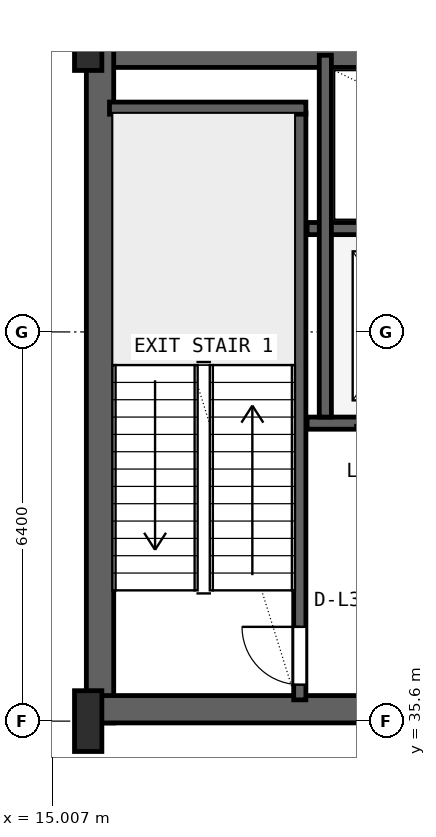
"""IFC4 building model, lengths in metres.
Left out: names, types, materials, properties, quantities, classifications, styles, units other than length and angle.
Written with IfcOpenShell. Run it as: python <this file> out.ifc"""

import sys

from ifc_helpers import new_model, si_unit, direction, frame, frame_2d, origin, origin_2d, place, context, subcontext, project, spatial, rectangle, i_section, extrude, source, transform, mapped, element, fill, save


model = new_model("IFC4")
c1 = context("Model", 3, precision=1e-05, world=origin(), true_north=direction((0.0, 1.0)))
c2 = subcontext(c1, "Body", "Model", "MODEL_VIEW")
j1 = project(units=[si_unit("LENGTHUNIT", "METRE"), si_unit("PLANEANGLEUNIT", "RADIAN")], contexts=[c1])
p1 = place(None, origin())
s1 = spatial("IfcSite", under=j1, at=p1, CompositionType="ELEMENT")
p2 = place(p1, origin())
s2 = spatial("IfcBuilding", under=s1, at=p2, CompositionType="ELEMENT")
p3 = place(p2, frame((0.0, 0.0, 141.0)))
s3 = spatial("IfcBuildingStorey", under=s2, at=p3, CompositionType="ELEMENT", Elevation=141.0)
p4 = place(p3, frame((15.6, 46.575, 0.0), z_axis=(0.0, 0.0, 1.0), x_axis=(1.0, 0.0, 0.0)))
e1 = element("IfcWall", 1, at=p4, inside=s3, PredefinedType="SHEAR", context=c2, shape_type="SweptSolid", body=[
    extrude(rectangle(XDim=36.8, YDim=0.45, at=frame_2d((18.4, 0.0))), origin(), (0.0, 0.0, 1.0), 4.55),
])
p5 = place(p3, frame((15.795, 35.57, 0.0), z_axis=(0.0, 0.0, 1.0), x_axis=(0.0, 1.0, 0.0)))
e2 = element("IfcWall", 2, at=p5, inside=s3, PredefinedType="SHEAR", context=c2, shape_type="SweptSolid", body=[
    extrude(rectangle(XDim=11.23, YDim=0.45, at=frame_2d((5.615, 0.0))), origin(), (0.0, 0.0, 1.0), 4.55),
])
p6 = place(p3, frame((15.57, 35.795, 0.0), z_axis=(0.0, 0.0, 1.0), x_axis=(1.0, 0.0, 0.0)))
e3 = element("IfcWall", 3, at=p6, inside=s3, PredefinedType="SHEAR", context=c2, shape_type="SweptSolid", body=[
    extrude(rectangle(XDim=9.23, YDim=0.45, at=frame_2d((4.615, 0.0))), origin(), (0.0, 0.0, 1.0), 4.55),
])
p7 = place(p6, frame((5.4, 0.0, 0.0)))
e4 = element("IfcOpeningElement", 4, at=p7, cuts=e3, PredefinedType="OPENING", context=c2, shape_type="SweptSolid", body=[
    extrude(rectangle(XDim=1.0, YDim=2.1, at=frame_2d((0.5, 1.05))), frame((0.0, 0.235, 0.0), z_axis=(0.0, -1.0, 0.0), x_axis=(1.0, 0.0, 0.0)), (0.0, 0.0, 1.0), 0.47),
])
m1 = source(origin(), c2, "Body", "SweptSolid", [
    extrude(i_section(OverallWidth=0.45, OverallDepth=1.0, WebThickness=0.016, FlangeThickness=0.03, FilletRadius=0.016, at=origin_2d()), origin(), (0.0, 0.0, 1.0), 4.8),
])
for number, where, z_axis, x_axis in (
    (5, (15.6, 35.6, 0.0), (0.0, 0.0, 1.0), (1.0, 0.0, 0.0)),
    (6, (15.6, 46.8, 0.0), (0.0, 0.0, 1.0), (1.0, 0.0, 0.0)),
):
    element("IfcColumn", number, at=place(p3, frame(where, z_axis=z_axis, x_axis=x_axis)), inside=s3, PredefinedType="COLUMN", context=c2, shape_type="MappedRepresentation", body=[
        mapped(m1, transform((0.0, 0.0, 0.0), x_axis=(1.0, 0.0, 0.0), y_axis=(0.0, 1.0, 0.0), z_axis=(0.0, 0.0, 1.0), scale=1.0)),
    ])
p8 = place(p3, frame((19.08, 35.95, 0.0), z_axis=(0.0, 0.0, 1.0), x_axis=(0.0, 1.0, 0.0)))
e7 = element("IfcWall", 7, at=p8, inside=s3, PredefinedType="SHEAR", context=c2, shape_type="SweptSolid", body=[
    extrude(rectangle(XDim=9.65, YDim=0.2, at=frame_2d((4.825, 0.0))), origin(), (0.0, 0.0, 1.0), 4.55),
])
p9 = place(p8, frame((0.25, 0.0, 0.0)))
e8 = element("IfcOpeningElement", 8, at=p9, cuts=e7, PredefinedType="OPENING", context=c2, shape_type="SweptSolid", body=[
    extrude(rectangle(XDim=0.95, YDim=2.1, at=frame_2d((0.475, 1.05))), frame((0.0, 0.11, 0.0), z_axis=(0.0, -1.0, 0.0), x_axis=(1.0, 0.0, 0.0)), (0.0, 0.0, 1.0), 0.22),
])
p10 = place(p3, frame((15.95, 45.68, 0.0), z_axis=(0.0, 0.0, 1.0), x_axis=(1.0, 0.0, 0.0)))
e9 = element("IfcWall", 9, at=p10, inside=s3, PredefinedType="SHEAR", context=c2, shape_type="SweptSolid", body=[
    extrude(rectangle(XDim=3.23, YDim=0.2, at=frame_2d((1.615, 0.0))), origin(), (0.0, 0.0, 1.0), 4.55),
])
p11 = place(p3, frame((19.2, 40.5, 0.0), z_axis=(0.0, 0.0, 1.0), x_axis=(1.0, 0.0, 0.0)))
e10 = element("IfcWall", 10, at=p11, inside=s3, PredefinedType="SHEAR", context=c2, shape_type="SweptSolid", body=[
    extrude(rectangle(XDim=5.52, YDim=0.2, at=frame_2d((2.76, 0.0))), origin(), (0.0, 0.0, 1.0), 4.55),
])
p12 = place(p11, frame((1.05, 0.0, 0.0)))
e11 = element("IfcOpeningElement", 11, at=p12, cuts=e10, PredefinedType="OPENING", context=c2, shape_type="SweptSolid", body=[
    extrude(rectangle(XDim=1.1, YDim=2.18, at=frame_2d((0.55, 1.09))), frame((0.0, 0.11, 0.0), z_axis=(0.0, -1.0, 0.0), x_axis=(1.0, 0.0, 0.0)), (0.0, 0.0, 1.0), 0.22),
])
p13 = place(p11, frame((3.65, 0.0, 0.0)))
e12 = element("IfcOpeningElement", 12, at=p13, cuts=e10, PredefinedType="OPENING", context=c2, shape_type="SweptSolid", body=[
    extrude(rectangle(XDim=1.1, YDim=2.18, at=frame_2d((0.55, 1.09))), frame((0.0, 0.11, 0.0), z_axis=(0.0, -1.0, 0.0), x_axis=(1.0, 0.0, 0.0)), (0.0, 0.0, 1.0), 0.22),
])
p14 = place(p3, frame((19.2, 43.7, 0.0), z_axis=(0.0, 0.0, 1.0), x_axis=(1.0, 0.0, 0.0)))
e13 = element("IfcWall", 13, at=p14, inside=s3, PredefinedType="SHEAR", context=c2, shape_type="SweptSolid", body=[
    extrude(rectangle(XDim=5.52, YDim=0.2, at=frame_2d((2.76, 0.0))), origin(), (0.0, 0.0, 1.0), 4.55),
])
p15 = place(p3, frame((19.5, 40.6, 0.0), z_axis=(0.0, 0.0, 1.0), x_axis=(0.0, 1.0, 0.0)))
e14 = element("IfcWall", 14, at=p15, inside=s3, PredefinedType="SHEAR", context=c2, shape_type="SweptSolid", body=[
    extrude(rectangle(XDim=5.95, YDim=0.2, at=frame_2d((2.975, 0.0))), origin(), (0.0, 0.0, 1.0), 4.55),
])
m2 = source(origin(), c2, "Body", "SweptSolid", [
    extrude(rectangle(XDim=0.95, YDim=2.1, at=frame_2d((0.475, 1.05))), frame((0.0, 0.025, 0.0), z_axis=(0.0, -1.0, 0.0), x_axis=(1.0, 0.0, 0.0)), (0.0, 0.0, 1.0), 0.05),
])
p16 = place(p9, origin())
e15 = element("IfcDoor", 15, at=p16, inside=s3, OperationType="SINGLE_SWING_RIGHT", PredefinedType="DOOR", context=c2, shape_type="MappedRepresentation", body=[
    mapped(m2, transform((0.0, 0.0, 0.0), x_axis=(1.0, 0.0, 0.0), y_axis=(0.0, 1.0, 0.0), z_axis=(0.0, 0.0, 1.0), scale=1.0)),
])
fill(e8, e15)
save(model, sys.argv[1])
